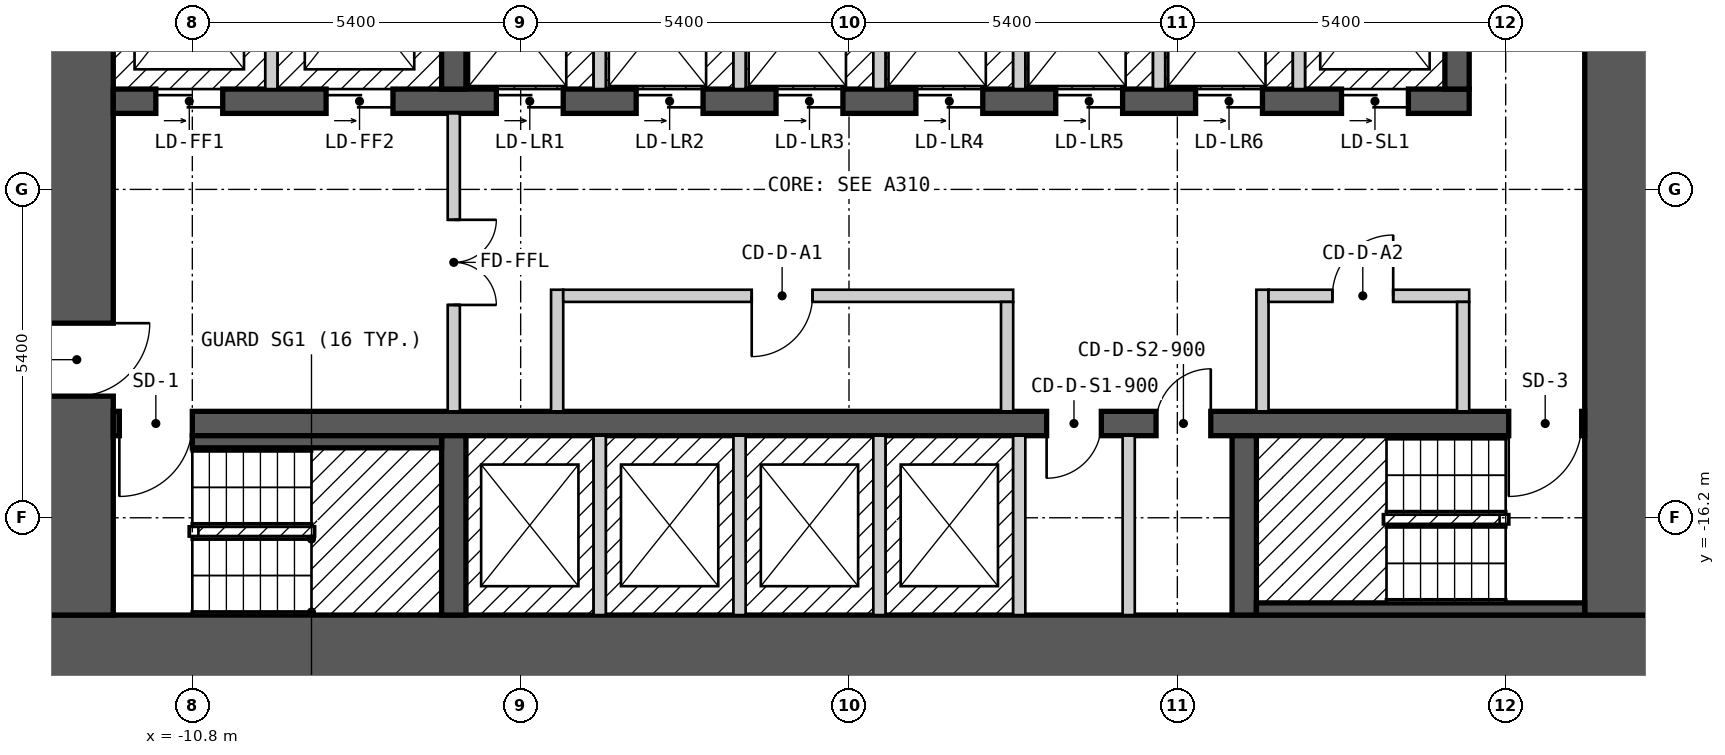
"""IFC4 building model, lengths in metres.
Left out: names, types, materials, properties, quantities, classifications, styles, units other than length and angle.
Written with IfcOpenShell. Run it as: python <this file> out.ifc"""

import sys

from ifc_helpers import new_model, si_unit, direction, frame, frame_2d, origin, place, context, subcontext, project, spatial, rectangle, extrude, element, fill, save


model = new_model("IFC4")
c1 = context("Model", 3, precision=1e-05, world=origin(), true_north=direction((0.0, 1.0)))
c2 = subcontext(c1, "Body", "Model", "MODEL_VIEW")
j1 = project(units=[si_unit("LENGTHUNIT", "METRE"), si_unit("PLANEANGLEUNIT", "RADIAN")], contexts=[c1])
p1 = place(None, origin())
s1 = spatial("IfcSite", under=j1, at=p1, CompositionType="ELEMENT")
p2 = place(p1, origin())
s2 = spatial("IfcBuilding", under=s1, at=p2, CompositionType="ELEMENT")
p3 = place(p2, frame((0.0, 0.0, 26.4)))
s3 = spatial("IfcBuildingStorey", under=s2, at=p3, CompositionType="ELEMENT", Elevation=26.4)
p4 = place(p3, frame((-13.3, -18.4, 0.0), z_axis=(0.0, 0.0, 1.0), x_axis=(1.0, 0.0, 0.0)))
e1 = element("IfcWall", 1, at=p4, inside=s3, PredefinedType="SHEAR", context=c2, shape_type="SweptSolid", body=[
    extrude(rectangle(XDim=26.6, YDim=1.2, at=frame_2d((13.3, 0.0))), origin(), (0.0, 0.0, 1.0), 2.7),
])
p5 = place(p3, frame((-12.7, -17.8, 0.0), z_axis=(0.0, 0.0, 1.0), x_axis=(0.0, 1.0, 0.0)))
e2 = element("IfcWall", 2, at=p5, inside=s3, PredefinedType="SHEAR", context=c2, shape_type="SweptSolid", body=[
    extrude(rectangle(XDim=11.6, YDim=1.2, at=frame_2d((5.8, 0.0))), origin(), (0.0, 0.0, 1.0), 2.7),
])
p6 = place(p5, frame((3.6, 0.0, 0.0)))
e3 = element("IfcOpeningElement", 3, at=p6, cuts=e2, PredefinedType="OPENING", context=c2, shape_type="SweptSolid", body=[
    extrude(rectangle(XDim=1.2, YDim=2.1, at=frame_2d((0.6, 1.05))), frame((0.0, 0.61, 0.0), z_axis=(0.0, -1.0, 0.0), x_axis=(1.0, 0.0, 0.0)), (0.0, 0.0, 1.0), 1.22),
])
p7 = place(p3, frame((12.7, -17.8, 0.0), z_axis=(0.0, 0.0, 1.0), x_axis=(0.0, 1.0, 0.0)))
e4 = element("IfcWall", 4, at=p7, inside=s3, PredefinedType="SHEAR", context=c2, shape_type="SweptSolid", body=[
    extrude(rectangle(XDim=11.6, YDim=1.2, at=frame_2d((5.8, 0.0))), origin(), (0.0, 0.0, 1.0), 2.7),
])
p8 = place(p3, frame((-12.1, -14.65, 0.0), z_axis=(0.0, 0.0, 1.0), x_axis=(1.0, 0.0, 0.0)))
e5 = element("IfcWall", 5, at=p8, inside=s3, PredefinedType="SHEAR", context=c2, shape_type="SweptSolid", body=[
    extrude(rectangle(XDim=24.2, YDim=0.4, at=frame_2d((12.1, 0.0))), origin(), (0.0, 0.0, 1.0), 2.7),
])
p9 = place(p8, frame((1.3, 0.0, 0.0), z_axis=(0.0, 0.0, 1.0), x_axis=(-1.0, 0.0, 0.0)))
e6 = element("IfcOpeningElement", 6, at=p9, cuts=e5, PredefinedType="OPENING", context=c2, shape_type="SweptSolid", body=[
    extrude(rectangle(XDim=1.2, YDim=2.1, at=frame_2d((0.6, 1.05))), frame((0.0, 0.21, 0.0), z_axis=(0.0, -1.0, 0.0), x_axis=(1.0, 0.0, 0.0)), (0.0, 0.0, 1.0), 0.42),
])
p10 = place(p8, frame((24.15, 0.0, 0.0), z_axis=(0.0, 0.0, 1.0), x_axis=(-1.0, 0.0, 0.0)))
e7 = element("IfcOpeningElement", 7, at=p10, cuts=e5, PredefinedType="OPENING", context=c2, shape_type="SweptSolid", body=[
    extrude(rectangle(XDim=1.2, YDim=2.1, at=frame_2d((0.6, 1.05))), frame((0.0, 0.21, 0.0), z_axis=(0.0, -1.0, 0.0), x_axis=(1.0, 0.0, 0.0)), (0.0, 0.0, 1.0), 0.42),
])
p11 = place(p8, frame((16.25, 0.0, 0.0), z_axis=(0.0, 0.0, 1.0), x_axis=(-1.0, 0.0, 0.0)))
e8 = element("IfcOpeningElement", 8, at=p11, cuts=e5, PredefinedType="OPENING", context=c2, shape_type="SweptSolid", body=[
    extrude(rectangle(XDim=0.9, YDim=2.1, at=frame_2d((0.45, 1.05))), frame((0.0, 0.21, 0.0), z_axis=(0.0, -1.0, 0.0), x_axis=(1.0, 0.0, 0.0)), (0.0, 0.0, 1.0), 0.42),
])
p12 = place(p8, frame((18.05, 0.0, 0.0), z_axis=(0.0, 0.0, 1.0), x_axis=(-1.0, 0.0, 0.0)))
e9 = element("IfcOpeningElement", 9, at=p12, cuts=e5, PredefinedType="OPENING", context=c2, shape_type="SweptSolid", body=[
    extrude(rectangle(XDim=0.9, YDim=2.1, at=frame_2d((0.45, 1.05))), frame((0.0, 0.21, 0.0), z_axis=(0.0, -1.0, 0.0), x_axis=(1.0, 0.0, 0.0)), (0.0, 0.0, 1.0), 0.42),
])
p13 = place(p3, frame((-12.1, -9.35, 0.0), z_axis=(0.0, 0.0, 1.0), x_axis=(1.0, 0.0, 0.0)))
e10 = element("IfcWall", 10, at=p13, inside=s3, PredefinedType="SHEAR", context=c2, shape_type="SweptSolid", body=[
    extrude(rectangle(XDim=22.3, YDim=0.4, at=frame_2d((11.15, 0.0))), origin(), (0.0, 0.0, 1.0), 2.7),
])
p14 = place(p13, frame((0.7, 0.0, 0.0)))
e11 = element("IfcOpeningElement", 11, at=p14, cuts=e10, PredefinedType="OPENING", context=c2, shape_type="SweptSolid", body=[
    extrude(rectangle(XDim=1.1, YDim=2.1, at=frame_2d((0.55, 1.05))), frame((0.0, 0.21, 0.0), z_axis=(0.0, -1.0, 0.0), x_axis=(1.0, 0.0, 0.0)), (0.0, 0.0, 1.0), 0.42),
])
p15 = place(p13, frame((3.5, 0.0, 0.0)))
e12 = element("IfcOpeningElement", 12, at=p15, cuts=e10, PredefinedType="OPENING", context=c2, shape_type="SweptSolid", body=[
    extrude(rectangle(XDim=1.1, YDim=2.1, at=frame_2d((0.55, 1.05))), frame((0.0, 0.21, 0.0), z_axis=(0.0, -1.0, 0.0), x_axis=(1.0, 0.0, 0.0)), (0.0, 0.0, 1.0), 0.42),
])
p16 = place(p13, frame((6.3, 0.0, 0.0)))
e13 = element("IfcOpeningElement", 13, at=p16, cuts=e10, PredefinedType="OPENING", context=c2, shape_type="SweptSolid", body=[
    extrude(rectangle(XDim=1.1, YDim=2.1, at=frame_2d((0.55, 1.05))), frame((0.0, 0.21, 0.0), z_axis=(0.0, -1.0, 0.0), x_axis=(1.0, 0.0, 0.0)), (0.0, 0.0, 1.0), 0.42),
])
p17 = place(p13, frame((8.6, 0.0, 0.0)))
e14 = element("IfcOpeningElement", 14, at=p17, cuts=e10, PredefinedType="OPENING", context=c2, shape_type="SweptSolid", body=[
    extrude(rectangle(XDim=1.1, YDim=2.1, at=frame_2d((0.55, 1.05))), frame((0.0, 0.21, 0.0), z_axis=(0.0, -1.0, 0.0), x_axis=(1.0, 0.0, 0.0)), (0.0, 0.0, 1.0), 0.42),
])
p18 = place(p13, frame((10.9, 0.0, 0.0)))
e15 = element("IfcOpeningElement", 15, at=p18, cuts=e10, PredefinedType="OPENING", context=c2, shape_type="SweptSolid", body=[
    extrude(rectangle(XDim=1.1, YDim=2.1, at=frame_2d((0.55, 1.05))), frame((0.0, 0.21, 0.0), z_axis=(0.0, -1.0, 0.0), x_axis=(1.0, 0.0, 0.0)), (0.0, 0.0, 1.0), 0.42),
])
p19 = place(p13, frame((13.2, 0.0, 0.0)))
e16 = element("IfcOpeningElement", 16, at=p19, cuts=e10, PredefinedType="OPENING", context=c2, shape_type="SweptSolid", body=[
    extrude(rectangle(XDim=1.1, YDim=2.1, at=frame_2d((0.55, 1.05))), frame((0.0, 0.21, 0.0), z_axis=(0.0, -1.0, 0.0), x_axis=(1.0, 0.0, 0.0)), (0.0, 0.0, 1.0), 0.42),
])
p20 = place(p13, frame((15.5, 0.0, 0.0)))
e17 = element("IfcOpeningElement", 17, at=p20, cuts=e10, PredefinedType="OPENING", context=c2, shape_type="SweptSolid", body=[
    extrude(rectangle(XDim=1.1, YDim=2.1, at=frame_2d((0.55, 1.05))), frame((0.0, 0.21, 0.0), z_axis=(0.0, -1.0, 0.0), x_axis=(1.0, 0.0, 0.0)), (0.0, 0.0, 1.0), 0.42),
])
p21 = place(p13, frame((17.8, 0.0, 0.0)))
e18 = element("IfcOpeningElement", 18, at=p21, cuts=e10, PredefinedType="OPENING", context=c2, shape_type="SweptSolid", body=[
    extrude(rectangle(XDim=1.1, YDim=2.1, at=frame_2d((0.55, 1.05))), frame((0.0, 0.21, 0.0), z_axis=(0.0, -1.0, 0.0), x_axis=(1.0, 0.0, 0.0)), (0.0, 0.0, 1.0), 0.42),
])
p22 = place(p13, frame((20.2, 0.0, 0.0)))
e19 = element("IfcOpeningElement", 19, at=p22, cuts=e10, PredefinedType="OPENING", context=c2, shape_type="SweptSolid", body=[
    extrude(rectangle(XDim=1.1, YDim=2.1, at=frame_2d((0.55, 1.05))), frame((0.0, 0.21, 0.0), z_axis=(0.0, -1.0, 0.0), x_axis=(1.0, 0.0, 0.0)), (0.0, 0.0, 1.0), 0.42),
])
for number, where, z_axis, x_axis in (
    (20, (-6.5, -17.8, 0.0), (0.0, 0.0, 1.0), (0.0, 1.0, 0.0)),
    (21, (6.5, -17.8, 0.0), (0.0, 0.0, 1.0), (0.0, 1.0, 0.0)),
    (22, (-6.5, -9.15, 0.0), (0.0, 0.0, 1.0), (0.0, 1.0, 0.0)),
    (23, (10.0, -9.15, 0.0), (0.0, 0.0, 1.0), (0.0, 1.0, 0.0)),
):
    element("IfcWall", number, at=place(p3, frame(where, z_axis=z_axis, x_axis=x_axis)), inside=s3, PredefinedType="SHEAR", context=c2, shape_type="SweptSolid", body=[
        extrude(rectangle(XDim=2.95, YDim=0.4, at=frame_2d((1.475, 0.0))), origin(), (0.0, 0.0, 1.0), 2.7),
    ])
p23 = place(p3, frame((-10.8, -14.95, 0.0), z_axis=(0.0, 0.0, 1.0), x_axis=(1.0, 0.0, 0.0)))
e24 = element("IfcWall", 24, at=p23, inside=s3, PredefinedType="SOLIDWALL", context=c2, shape_type="SweptSolid", body=[
    extrude(rectangle(XDim=4.1, YDim=0.2, at=frame_2d((2.05, 0.0))), origin(), (0.0, 0.0, 1.0), 2.7),
])
p24 = place(p3, frame((-9.5, -9.15, 0.0), z_axis=(0.0, 0.0, 1.0), x_axis=(0.0, 1.0, 0.0)))
e25 = element("IfcWall", 25, at=p24, inside=s3, PredefinedType="SOLIDWALL", context=c2, shape_type="SweptSolid", body=[
    extrude(rectangle(XDim=2.95, YDim=0.2, at=frame_2d((1.475, 0.0))), origin(), (0.0, 0.0, 1.0), 2.7),
])
p25 = place(p3, frame((-6.5, -14.45, 0.0), z_axis=(0.0, 0.0, 1.0), x_axis=(0.0, 1.0, 0.0)))
e26 = element("IfcWall", 26, at=p25, inside=s3, PredefinedType="PARTITIONING", context=c2, shape_type="SweptSolid", body=[
    extrude(rectangle(XDim=4.9, YDim=0.2, at=frame_2d((2.45, 0.0))), origin(), (0.0, 0.0, 1.0), 2.7),
])
p26 = place(p25, frame((3.15, 0.0, 0.0), z_axis=(0.0, 0.0, 1.0), x_axis=(-1.0, 0.0, 0.0)))
e27 = element("IfcOpeningElement", 27, at=p26, cuts=e26, PredefinedType="OPENING", context=c2, shape_type="SweptSolid", body=[
    extrude(rectangle(XDim=1.4, YDim=2.1, at=frame_2d((0.7, 1.05))), frame((0.0, 0.11, 0.0), z_axis=(0.0, -1.0, 0.0), x_axis=(1.0, 0.0, 0.0)), (0.0, 0.0, 1.0), 0.22),
])
p27 = place(p3, frame((-4.8, -14.45, 0.0), z_axis=(0.0, 0.0, 1.0), x_axis=(0.0, 1.0, 0.0)))
e28 = element("IfcWall", 28, at=p27, inside=s3, PredefinedType="PARTITIONING", context=c2, shape_type="SweptSolid", body=[
    extrude(rectangle(XDim=2.0, YDim=0.2, at=frame_2d((1.0, 0.0))), origin(), (0.0, 0.0, 1.0), 2.7),
])
p28 = place(p3, frame((-4.7, -12.55, 0.0), z_axis=(0.0, 0.0, 1.0), x_axis=(1.0, 0.0, 0.0)))
e29 = element("IfcWall", 29, at=p28, inside=s3, PredefinedType="PARTITIONING", context=c2, shape_type="SweptSolid", body=[
    extrude(rectangle(XDim=7.4, YDim=0.2, at=frame_2d((3.7, 0.0))), origin(), (0.0, 0.0, 1.0), 2.7),
])
p29 = place(p28, frame((4.1, 0.0, 0.0), z_axis=(0.0, 0.0, 1.0), x_axis=(-1.0, 0.0, 0.0)))
e30 = element("IfcOpeningElement", 30, at=p29, cuts=e29, PredefinedType="OPENING", context=c2, shape_type="SweptSolid", body=[
    extrude(rectangle(XDim=1.0, YDim=2.1, at=frame_2d((0.5, 1.05))), frame((0.0, 0.11, 0.0), z_axis=(0.0, -1.0, 0.0), x_axis=(1.0, 0.0, 0.0)), (0.0, 0.0, 1.0), 0.22),
])
for number, where, z_axis, x_axis in (
    (31, (-4.1, -17.8, 0.0), (0.0, 0.0, 1.0), (0.0, 1.0, 0.0)),
    (32, (-4.1, -9.15, 0.0), (0.0, 0.0, 1.0), (0.0, 1.0, 0.0)),
    (33, (-1.8, -17.8, 0.0), (0.0, 0.0, 1.0), (0.0, 1.0, 0.0)),
    (34, (-1.8, -9.15, 0.0), (0.0, 0.0, 1.0), (0.0, 1.0, 0.0)),
    (35, (0.5, -17.8, 0.0), (0.0, 0.0, 1.0), (0.0, 1.0, 0.0)),
    (36, (0.5, -9.15, 0.0), (0.0, 0.0, 1.0), (0.0, 1.0, 0.0)),
):
    element("IfcWall", number, at=place(p3, frame(where, z_axis=z_axis, x_axis=x_axis)), inside=s3, PredefinedType="SOLIDWALL", context=c2, shape_type="SweptSolid", body=[
        extrude(rectangle(XDim=2.95, YDim=0.2, at=frame_2d((1.475, 0.0))), origin(), (0.0, 0.0, 1.0), 2.7),
    ])
p30 = place(p3, frame((2.6, -14.45, 0.0), z_axis=(0.0, 0.0, 1.0), x_axis=(0.0, 1.0, 0.0)))
e37 = element("IfcWall", 37, at=p30, inside=s3, PredefinedType="PARTITIONING", context=c2, shape_type="SweptSolid", body=[
    extrude(rectangle(XDim=1.8, YDim=0.2, at=frame_2d((0.9, 0.0))), origin(), (0.0, 0.0, 1.0), 2.7),
])
for number, where, z_axis, x_axis in (
    (38, (2.8, -17.8, 0.0), (0.0, 0.0, 1.0), (0.0, 1.0, 0.0)),
    (39, (2.8, -9.15, 0.0), (0.0, 0.0, 1.0), (0.0, 1.0, 0.0)),
):
    element("IfcWall", number, at=place(p3, frame(where, z_axis=z_axis, x_axis=x_axis)), inside=s3, PredefinedType="SOLIDWALL", context=c2, shape_type="SweptSolid", body=[
        extrude(rectangle(XDim=2.95, YDim=0.2, at=frame_2d((1.475, 0.0))), origin(), (0.0, 0.0, 1.0), 2.7),
    ])
p31 = place(p3, frame((4.6, -17.8, 0.0), z_axis=(0.0, 0.0, 1.0), x_axis=(0.0, 1.0, 0.0)))
e40 = element("IfcWall", 40, at=p31, inside=s3, PredefinedType="PARTITIONING", context=c2, shape_type="SweptSolid", body=[
    extrude(rectangle(XDim=2.95, YDim=0.2, at=frame_2d((1.475, 0.0))), origin(), (0.0, 0.0, 1.0), 2.7),
])
p32 = place(p3, frame((5.1, -9.15, 0.0), z_axis=(0.0, 0.0, 1.0), x_axis=(0.0, 1.0, 0.0)))
e41 = element("IfcWall", 41, at=p32, inside=s3, PredefinedType="SOLIDWALL", context=c2, shape_type="SweptSolid", body=[
    extrude(rectangle(XDim=2.95, YDim=0.2, at=frame_2d((1.475, 0.0))), origin(), (0.0, 0.0, 1.0), 2.7),
])
p33 = place(p3, frame((6.7, -17.7, 0.0), z_axis=(0.0, 0.0, 1.0), x_axis=(1.0, 0.0, 0.0)))
e42 = element("IfcWall", 42, at=p33, inside=s3, PredefinedType="SOLIDWALL", context=c2, shape_type="SweptSolid", body=[
    extrude(rectangle(XDim=5.4, YDim=0.2, at=frame_2d((2.7, 0.0))), origin(), (0.0, 0.0, 1.0), 2.7),
])
p34 = place(p3, frame((6.8, -14.45, 0.0), z_axis=(0.0, 0.0, 1.0), x_axis=(0.0, 1.0, 0.0)))
e43 = element("IfcWall", 43, at=p34, inside=s3, PredefinedType="PARTITIONING", context=c2, shape_type="SweptSolid", body=[
    extrude(rectangle(XDim=2.0, YDim=0.2, at=frame_2d((1.0, 0.0))), origin(), (0.0, 0.0, 1.0), 2.7),
])
p35 = place(p3, frame((6.9, -12.55, 0.0), z_axis=(0.0, 0.0, 1.0), x_axis=(1.0, 0.0, 0.0)))
e44 = element("IfcWall", 44, at=p35, inside=s3, PredefinedType="PARTITIONING", context=c2, shape_type="SweptSolid", body=[
    extrude(rectangle(XDim=3.3, YDim=0.2, at=frame_2d((1.65, 0.0))), origin(), (0.0, 0.0, 1.0), 2.7),
])
p36 = place(p35, frame((2.05, 0.0, 0.0), z_axis=(0.0, 0.0, 1.0), x_axis=(-1.0, 0.0, 0.0)))
e45 = element("IfcOpeningElement", 45, at=p36, cuts=e44, PredefinedType="OPENING", context=c2, shape_type="SweptSolid", body=[
    extrude(rectangle(XDim=1.0, YDim=2.1, at=frame_2d((0.5, 1.05))), frame((0.0, 0.11, 0.0), z_axis=(0.0, -1.0, 0.0), x_axis=(1.0, 0.0, 0.0)), (0.0, 0.0, 1.0), 0.22),
])
p37 = place(p3, frame((7.4, -9.15, 0.0), z_axis=(0.0, 0.0, 1.0), x_axis=(0.0, 1.0, 0.0)))
e46 = element("IfcWall", 46, at=p37, inside=s3, PredefinedType="SOLIDWALL", context=c2, shape_type="SweptSolid", body=[
    extrude(rectangle(XDim=2.95, YDim=0.2, at=frame_2d((1.475, 0.0))), origin(), (0.0, 0.0, 1.0), 2.7),
])
p38 = place(p3, frame((10.1, -14.45, 0.0), z_axis=(0.0, 0.0, 1.0), x_axis=(0.0, 1.0, 0.0)))
e47 = element("IfcWall", 47, at=p38, inside=s3, PredefinedType="PARTITIONING", context=c2, shape_type="SweptSolid", body=[
    extrude(rectangle(XDim=1.8, YDim=0.2, at=frame_2d((0.9, 0.0))), origin(), (0.0, 0.0, 1.0), 2.7),
])
p39 = place(p14, origin())
e48 = element("IfcDoor", 48, at=p39, inside=s3, OperationType="DOUBLE_DOOR_SLIDING", PredefinedType="DOOR", context=c2, shape_type="SweptSolid", body=[
    extrude(rectangle(XDim=1.1, YDim=2.1, at=frame_2d((0.55, 1.05))), frame((0.0, 0.025, 0.0), z_axis=(0.0, -1.0, 0.0), x_axis=(1.0, 0.0, 0.0)), (0.0, 0.0, 1.0), 0.05),
])
fill(e11, e48)
p40 = place(p15, origin())
e49 = element("IfcDoor", 49, at=p40, inside=s3, OperationType="DOUBLE_DOOR_SLIDING", PredefinedType="DOOR", context=c2, shape_type="SweptSolid", body=[
    extrude(rectangle(XDim=1.1, YDim=2.1, at=frame_2d((0.55, 1.05))), frame((0.0, 0.025, 0.0), z_axis=(0.0, -1.0, 0.0), x_axis=(1.0, 0.0, 0.0)), (0.0, 0.0, 1.0), 0.05),
])
fill(e12, e49)
p41 = place(p16, origin())
e50 = element("IfcDoor", 50, at=p41, inside=s3, OperationType="DOUBLE_DOOR_SLIDING", PredefinedType="DOOR", context=c2, shape_type="SweptSolid", body=[
    extrude(rectangle(XDim=1.1, YDim=2.1, at=frame_2d((0.55, 1.05))), frame((0.0, 0.025, 0.0), z_axis=(0.0, -1.0, 0.0), x_axis=(1.0, 0.0, 0.0)), (0.0, 0.0, 1.0), 0.05),
])
fill(e13, e50)
p42 = place(p17, origin())
e51 = element("IfcDoor", 51, at=p42, inside=s3, OperationType="DOUBLE_DOOR_SLIDING", PredefinedType="DOOR", context=c2, shape_type="SweptSolid", body=[
    extrude(rectangle(XDim=1.1, YDim=2.1, at=frame_2d((0.55, 1.05))), frame((0.0, 0.025, 0.0), z_axis=(0.0, -1.0, 0.0), x_axis=(1.0, 0.0, 0.0)), (0.0, 0.0, 1.0), 0.05),
])
fill(e14, e51)
p43 = place(p18, origin())
e52 = element("IfcDoor", 52, at=p43, inside=s3, OperationType="DOUBLE_DOOR_SLIDING", PredefinedType="DOOR", context=c2, shape_type="SweptSolid", body=[
    extrude(rectangle(XDim=1.1, YDim=2.1, at=frame_2d((0.55, 1.05))), frame((0.0, 0.025, 0.0), z_axis=(0.0, -1.0, 0.0), x_axis=(1.0, 0.0, 0.0)), (0.0, 0.0, 1.0), 0.05),
])
fill(e15, e52)
p44 = place(p19, origin())
e53 = element("IfcDoor", 53, at=p44, inside=s3, OperationType="DOUBLE_DOOR_SLIDING", PredefinedType="DOOR", context=c2, shape_type="SweptSolid", body=[
    extrude(rectangle(XDim=1.1, YDim=2.1, at=frame_2d((0.55, 1.05))), frame((0.0, 0.025, 0.0), z_axis=(0.0, -1.0, 0.0), x_axis=(1.0, 0.0, 0.0)), (0.0, 0.0, 1.0), 0.05),
])
fill(e16, e53)
p45 = place(p20, origin())
e54 = element("IfcDoor", 54, at=p45, inside=s3, OperationType="DOUBLE_DOOR_SLIDING", PredefinedType="DOOR", context=c2, shape_type="SweptSolid", body=[
    extrude(rectangle(XDim=1.1, YDim=2.1, at=frame_2d((0.55, 1.05))), frame((0.0, 0.025, 0.0), z_axis=(0.0, -1.0, 0.0), x_axis=(1.0, 0.0, 0.0)), (0.0, 0.0, 1.0), 0.05),
])
fill(e17, e54)
p46 = place(p21, origin())
e55 = element("IfcDoor", 55, at=p46, inside=s3, OperationType="DOUBLE_DOOR_SLIDING", PredefinedType="DOOR", context=c2, shape_type="SweptSolid", body=[
    extrude(rectangle(XDim=1.1, YDim=2.1, at=frame_2d((0.55, 1.05))), frame((0.0, 0.025, 0.0), z_axis=(0.0, -1.0, 0.0), x_axis=(1.0, 0.0, 0.0)), (0.0, 0.0, 1.0), 0.05),
])
fill(e18, e55)
p47 = place(p22, origin())
e56 = element("IfcDoor", 56, at=p47, inside=s3, OperationType="DOUBLE_DOOR_SLIDING", PredefinedType="DOOR", context=c2, shape_type="SweptSolid", body=[
    extrude(rectangle(XDim=1.1, YDim=2.1, at=frame_2d((0.55, 1.05))), frame((0.0, 0.025, 0.0), z_axis=(0.0, -1.0, 0.0), x_axis=(1.0, 0.0, 0.0)), (0.0, 0.0, 1.0), 0.05),
])
fill(e19, e56)
p48 = place(p9, origin())
e57 = element("IfcDoor", 57, at=p48, inside=s3, OperationType="SINGLE_SWING_RIGHT", PredefinedType="DOOR", context=c2, shape_type="SweptSolid", body=[
    extrude(rectangle(XDim=1.2, YDim=2.1, at=frame_2d((0.6, 1.05))), frame((0.0, 0.025, 0.0), z_axis=(0.0, -1.0, 0.0), x_axis=(1.0, 0.0, 0.0)), (0.0, 0.0, 1.0), 0.05),
])
fill(e6, e57)
p49 = place(p10, origin())
e58 = element("IfcDoor", 58, at=p49, inside=s3, OperationType="SINGLE_SWING_RIGHT", PredefinedType="DOOR", context=c2, shape_type="SweptSolid", body=[
    extrude(rectangle(XDim=1.2, YDim=2.1, at=frame_2d((0.6, 1.05))), frame((0.0, 0.025, 0.0), z_axis=(0.0, -1.0, 0.0), x_axis=(1.0, 0.0, 0.0)), (0.0, 0.0, 1.0), 0.05),
])
fill(e7, e58)
p50 = place(p6, origin())
e59 = element("IfcDoor", 59, at=p50, inside=s3, OperationType="SINGLE_SWING_RIGHT", PredefinedType="DOOR", context=c2, shape_type="SweptSolid", body=[
    extrude(rectangle(XDim=1.2, YDim=2.1, at=frame_2d((0.6, 1.05))), frame((0.0, 0.025, 0.0), z_axis=(0.0, -1.0, 0.0), x_axis=(1.0, 0.0, 0.0)), (0.0, 0.0, 1.0), 0.05),
])
fill(e3, e59)
p51 = place(p26, origin())
e60 = element("IfcDoor", 60, at=p51, inside=s3, OperationType="DOUBLE_DOOR_SINGLE_SWING", PredefinedType="DOOR", context=c2, shape_type="SweptSolid", body=[
    extrude(rectangle(XDim=1.4, YDim=2.1, at=frame_2d((0.7, 1.05))), frame((0.0, 0.025, 0.0), z_axis=(0.0, -1.0, 0.0), x_axis=(1.0, 0.0, 0.0)), (0.0, 0.0, 1.0), 0.05),
])
fill(e27, e60)
p52 = place(p29, origin())
e61 = element("IfcDoor", 61, at=p52, inside=s3, OperationType="SINGLE_SWING_RIGHT", PredefinedType="DOOR", context=c2, shape_type="SweptSolid", body=[
    extrude(rectangle(XDim=1.0, YDim=2.1, at=frame_2d((0.5, 1.05))), frame((0.0, 0.025, 0.0), z_axis=(0.0, -1.0, 0.0), x_axis=(1.0, 0.0, 0.0)), (0.0, 0.0, 1.0), 0.05),
])
fill(e30, e61)
p53 = place(p36, origin())
e62 = element("IfcDoor", 62, at=p53, inside=s3, OperationType="SINGLE_SWING_LEFT", PredefinedType="DOOR", context=c2, shape_type="SweptSolid", body=[
    extrude(rectangle(XDim=1.0, YDim=2.1, at=frame_2d((0.5, 1.05))), frame((0.0, 0.025, 0.0), z_axis=(0.0, -1.0, 0.0), x_axis=(1.0, 0.0, 0.0)), (0.0, 0.0, 1.0), 0.05),
])
fill(e45, e62)
p54 = place(p11, origin())
e63 = element("IfcDoor", 63, at=p54, inside=s3, OperationType="SINGLE_SWING_RIGHT", PredefinedType="DOOR", context=c2, shape_type="SweptSolid", body=[
    extrude(rectangle(XDim=0.9, YDim=2.1, at=frame_2d((0.45, 1.05))), frame((0.0, 0.025, 0.0), z_axis=(0.0, -1.0, 0.0), x_axis=(1.0, 0.0, 0.0)), (0.0, 0.0, 1.0), 0.05),
])
fill(e8, e63)
p55 = place(p12, origin())
e64 = element("IfcDoor", 64, at=p55, inside=s3, OperationType="SINGLE_SWING_LEFT", PredefinedType="DOOR", context=c2, shape_type="SweptSolid", body=[
    extrude(rectangle(XDim=0.9, YDim=2.1, at=frame_2d((0.45, 1.05))), frame((0.0, 0.025, 0.0), z_axis=(0.0, -1.0, 0.0), x_axis=(1.0, 0.0, 0.0)), (0.0, 0.0, 1.0), 0.05),
])
fill(e9, e64)
save(model, sys.argv[1])
